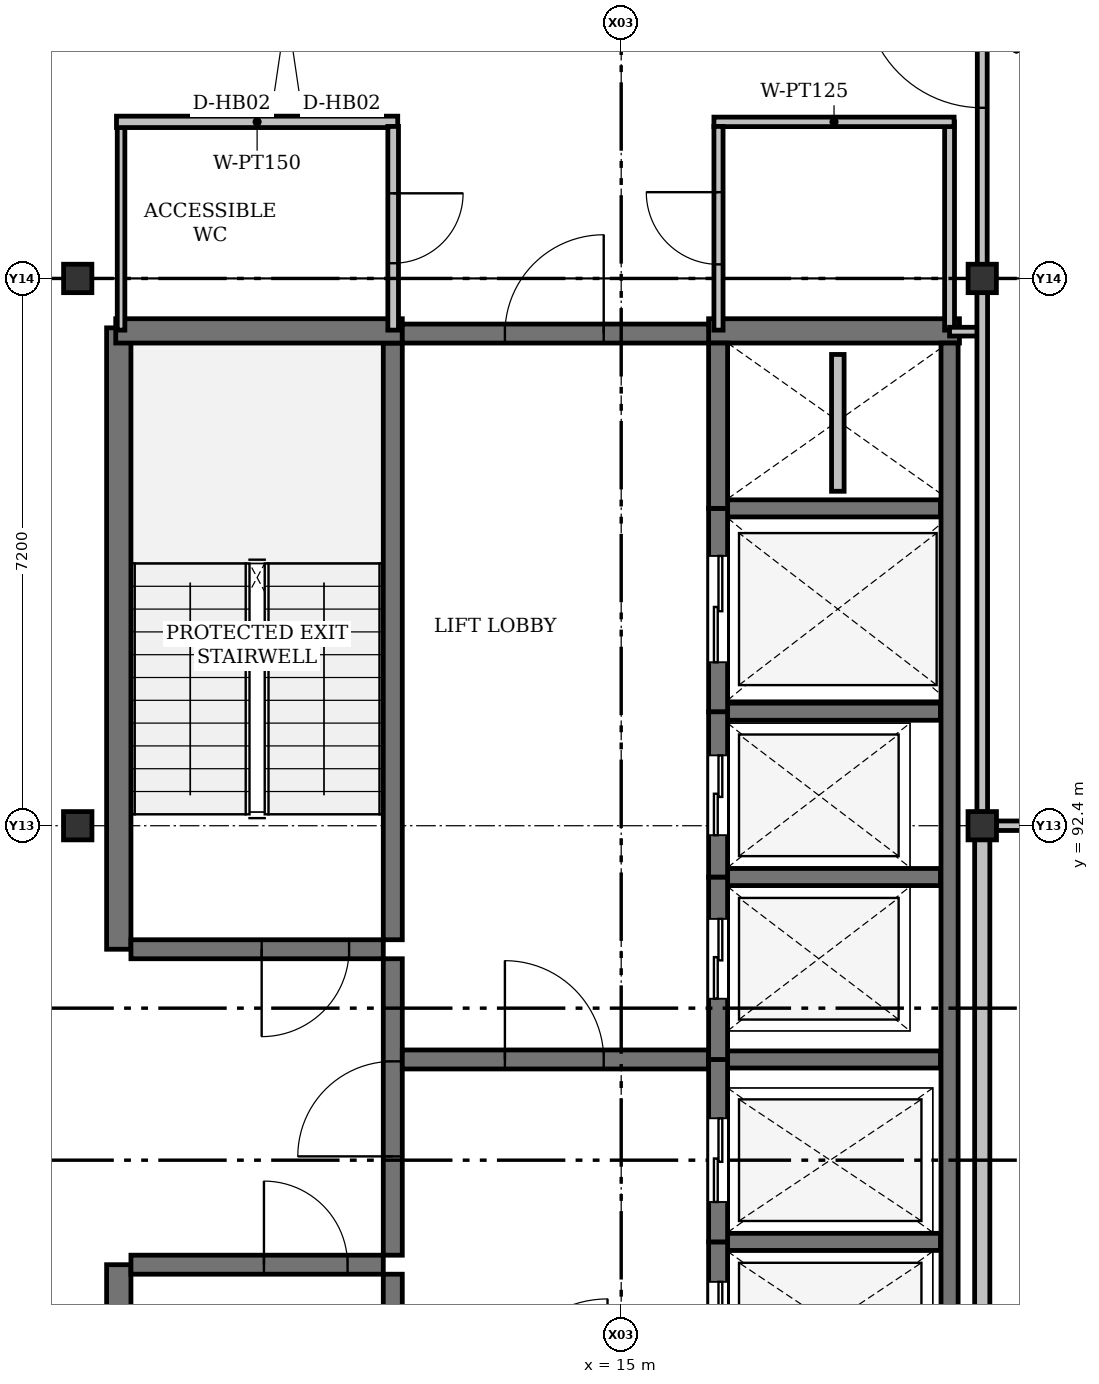
"""IFC4 building model, lengths in metres.
Left out: names, types, materials, properties, quantities, classifications, styles, units other than length and angle.
Written with IfcOpenShell. Run it as: python <this file> out.ifc"""

import sys

from ifc_helpers import new_model, si_unit, direction, frame, frame_2d, origin, origin_2d, place, context, subcontext, project, spatial, rectangle, i_section, extrude, element, fill, save


model = new_model("IFC4")
c1 = context("Model", 3, precision=1e-05, world=origin(), true_north=direction((0.0, 1.0)))
c2 = subcontext(c1, "Body", "Model", "MODEL_VIEW")
j1 = project(units=[si_unit("LENGTHUNIT", "METRE"), si_unit("PLANEANGLEUNIT", "RADIAN")], contexts=[c1])
p1 = place(None, origin())
s1 = spatial("IfcSite", under=j1, at=p1, CompositionType="ELEMENT")
p2 = place(p1, origin())
s2 = spatial("IfcBuilding", under=s1, at=p2, CompositionType="ELEMENT")
p3 = place(p2, frame((0.0, 0.0, 26.7)))
s3 = spatial("IfcBuildingStorey", under=s2, at=p3, CompositionType="ELEMENT", Elevation=26.7)
for number, where, z_axis, x_axis in (
    (1, (7.85, 92.4, 0.0), (0.0, 0.0, 1.0), (1.0, 0.0, 0.0)),
    (2, (19.75, 92.4, 0.0), (0.0, 0.0, 1.0), (1.0, 0.0, 0.0)),
    (3, (7.85, 99.6, 0.0), (0.0, 0.0, 1.0), (0.0, 1.0, 0.0)),
    (4, (19.75, 99.6, 0.0), (0.0, 0.0, 1.0), (0.0, 1.0, 0.0)),
):
    element("IfcColumn", number, at=place(p3, frame(where, z_axis=z_axis, x_axis=x_axis)), inside=s3, PredefinedType="COLUMN", context=c2, shape_type="SweptSolid", body=[
        extrude(i_section(OverallWidth=0.374, OverallDepth=0.372, WebThickness=0.016, FlangeThickness=0.026, FilletRadius=0.015, at=origin_2d()), origin(), (0.0, 0.0, 1.0), 4.2),
    ])
for number, where, z_axis, x_axis in (
    (5, (8.39, 78.45, 0.0), (0.0, 0.0, 1.0), (0.0, 1.0, 0.0)),
    (6, (8.39, 90.775, 0.0), (0.0, 0.0, 1.0), (0.0, 1.0, 0.0)),
):
    element("IfcWall", number, at=place(p3, frame(where, z_axis=z_axis, x_axis=x_axis)), inside=s3, PredefinedType="SHEAR", context=c2, shape_type="SweptSolid", body=[
        extrude(rectangle(XDim=8.175, YDim=0.32, at=frame_2d((4.087, 0.0))), origin(), (0.0, 0.0, 1.0), 4.2),
    ])
for number, where, z_axis, x_axis in (
    (7, (11.995, 78.65, 0.0), (0.0, 0.0, 1.0), (0.0, 1.0, 0.0)),
    (8, (11.995, 90.9, 0.0), (0.0, 0.0, 1.0), (0.0, 1.0, 0.0)),
):
    element("IfcWall", number, at=place(p3, frame(where, z_axis=z_axis, x_axis=x_axis)), inside=s3, PredefinedType="SHEAR", context=c2, shape_type="SweptSolid", body=[
        extrude(rectangle(XDim=7.85, YDim=0.25, at=frame_2d((3.925, 0.0))), origin(), (0.0, 0.0, 1.0), 4.2),
    ])
p4 = place(p3, frame((11.995, 86.75, 0.0), z_axis=(0.0, 0.0, 1.0), x_axis=(0.0, 1.0, 0.0)))
e9 = element("IfcWall", 9, at=p4, inside=s3, PredefinedType="SHEAR", context=c2, shape_type="SweptSolid", body=[
    extrude(rectangle(XDim=3.9, YDim=0.25, at=frame_2d((1.95, 0.0))), origin(), (0.0, 0.0, 1.0), 4.2),
])
p5 = place(p4, frame((1.3, 0.0, 0.0)))
e10 = element("IfcOpeningElement", 10, at=p5, cuts=e9, PredefinedType="OPENING", context=c2, shape_type="SweptSolid", body=[
    extrude(rectangle(XDim=1.25, YDim=2.2, at=frame_2d((0.625, 1.1))), frame((0.0, 0.125, 0.0), z_axis=(0.0, -1.0, 0.0), x_axis=(1.0, 0.0, 0.0)), (0.0, 0.0, 1.0), 0.25),
])
p6 = place(p3, frame((8.35, 98.91, 0.0), z_axis=(0.0, 0.0, 1.0), x_axis=(1.0, 0.0, 0.0)))
e11 = element("IfcWall", 11, at=p6, inside=s3, PredefinedType="SHEAR", context=c2, shape_type="SweptSolid", body=[
    extrude(rectangle(XDim=3.77, YDim=0.32, at=frame_2d((1.885, 0.0))), origin(), (0.0, 0.0, 1.0), 4.2),
])
p7 = place(p3, frame((16.15, 98.91, 0.0), z_axis=(0.0, 0.0, 1.0), x_axis=(1.0, 0.0, 0.0)))
e12 = element("IfcWall", 12, at=p7, inside=s3, PredefinedType="SHEAR", context=c2, shape_type="SweptSolid", body=[
    extrude(rectangle(XDim=3.3, YDim=0.32, at=frame_2d((1.65, 0.0))), origin(), (0.0, 0.0, 1.0), 4.2),
])
p8 = place(p3, frame((12.12, 98.875, 0.0), z_axis=(0.0, 0.0, 1.0), x_axis=(1.0, 0.0, 0.0)))
e13 = element("IfcWall", 13, at=p8, inside=s3, PredefinedType="SHEAR", context=c2, shape_type="SweptSolid", body=[
    extrude(rectangle(XDim=4.03, YDim=0.25, at=frame_2d((2.015, 0.0))), origin(), (0.0, 0.0, 1.0), 4.2),
])
p9 = place(p8, frame((1.35, 0.0, 0.0)))
e14 = element("IfcOpeningElement", 14, at=p9, cuts=e13, PredefinedType="OPENING", context=c2, shape_type="SweptSolid", body=[
    extrude(rectangle(XDim=1.3, YDim=2.2, at=frame_2d((0.65, 1.1))), frame((0.0, 0.125, 0.0), z_axis=(0.0, -1.0, 0.0), x_axis=(1.0, 0.0, 0.0)), (0.0, 0.0, 1.0), 0.25),
])
p10 = place(p3, frame((8.55, 86.625, 0.0), z_axis=(0.0, 0.0, 1.0), x_axis=(1.0, 0.0, 0.0)))
e15 = element("IfcWall", 15, at=p10, inside=s3, PredefinedType="SHEAR", context=c2, shape_type="SweptSolid", body=[
    extrude(rectangle(XDim=3.32, YDim=0.25, at=frame_2d((1.66, 0.0))), origin(), (0.0, 0.0, 1.0), 4.2),
])
p11 = place(p10, frame((1.75, 0.0, 0.0)))
e16 = element("IfcOpeningElement", 16, at=p11, cuts=e15, PredefinedType="OPENING", context=c2, shape_type="SweptSolid", body=[
    extrude(rectangle(XDim=1.1, YDim=2.15, at=frame_2d((0.55, 1.075))), frame((0.0, 0.125, 0.0), z_axis=(0.0, -1.0, 0.0), x_axis=(1.0, 0.0, 0.0)), (0.0, 0.0, 1.0), 0.25),
])
p12 = place(p3, frame((11.87, 90.775, 0.0), z_axis=(0.0, 0.0, 1.0), x_axis=(-1.0, 0.0, 0.0)))
e17 = element("IfcWall", 17, at=p12, inside=s3, PredefinedType="SHEAR", context=c2, shape_type="SweptSolid", body=[
    extrude(rectangle(XDim=3.32, YDim=0.25, at=frame_2d((1.66, 0.0))), origin(), (0.0, 0.0, 1.0), 4.2),
])
p13 = place(p12, frame((0.45, 0.0, 0.0)))
e18 = element("IfcOpeningElement", 18, at=p13, cuts=e17, PredefinedType="OPENING", context=c2, shape_type="SweptSolid", body=[
    extrude(rectangle(XDim=1.15, YDim=2.15, at=frame_2d((0.575, 1.075))), frame((0.0, 0.125, 0.0), z_axis=(0.0, -1.0, 0.0), x_axis=(1.0, 0.0, 0.0)), (0.0, 0.0, 1.0), 0.25),
])
p14 = place(p3, frame((12.12, 89.325, 0.0), z_axis=(0.0, 0.0, 1.0), x_axis=(1.0, 0.0, 0.0)))
e19 = element("IfcWall", 19, at=p14, inside=s3, PredefinedType="SHEAR", context=c2, shape_type="SweptSolid", body=[
    extrude(rectangle(XDim=4.03, YDim=0.25, at=frame_2d((2.015, 0.0))), origin(), (0.0, 0.0, 1.0), 4.2),
])
p15 = place(p14, frame((1.35, 0.0, 0.0)))
e20 = element("IfcOpeningElement", 20, at=p15, cuts=e19, PredefinedType="OPENING", context=c2, shape_type="SweptSolid", body=[
    extrude(rectangle(XDim=1.3, YDim=2.2, at=frame_2d((0.65, 1.1))), frame((0.0, 0.125, 0.0), z_axis=(0.0, -1.0, 0.0), x_axis=(1.0, 0.0, 0.0)), (0.0, 0.0, 1.0), 0.25),
])
p16 = place(p3, frame((19.32, 84.8, 0.0), z_axis=(0.0, 0.0, 1.0), x_axis=(0.0, 1.0, 0.0)))
e21 = element("IfcWall", 21, at=p16, inside=s3, PredefinedType="SHEAR", context=c2, shape_type="SweptSolid", body=[
    extrude(rectangle(XDim=13.95, YDim=0.225, at=frame_2d((6.975, 0.0))), origin(), (0.0, 0.0, 1.0), 4.2),
])
for number, where, z_axis, x_axis in (
    (22, (16.4, 86.925, 0.0), (0.0, 0.0, 1.0), (1.0, 0.0, 0.0)),
    (23, (16.4, 89.325, 0.0), (0.0, 0.0, 1.0), (1.0, 0.0, 0.0)),
    (24, (16.4, 91.725, 0.0), (0.0, 0.0, 1.0), (1.0, 0.0, 0.0)),
    (25, (16.4, 93.9, 0.0), (0.0, 0.0, 1.0), (1.0, 0.0, 0.0)),
    (26, (16.4, 96.575, 0.0), (0.0, 0.0, 1.0), (1.0, 0.0, 0.0)),
):
    element("IfcWall", number, at=place(p3, frame(where, z_axis=z_axis, x_axis=x_axis)), inside=s3, PredefinedType="SHEAR", context=c2, shape_type="SweptSolid", body=[
        extrude(rectangle(XDim=2.8, YDim=0.225, at=frame_2d((1.4, 0.0))), origin(), (0.0, 0.0, 1.0), 4.2),
    ])
p17 = place(p3, frame((16.275, 84.8, 0.0), z_axis=(0.0, 0.0, 1.0), x_axis=(0.0, 1.0, 0.0)))
e27 = element("IfcWall", 27, at=p17, inside=s3, PredefinedType="SHEAR", context=c2, shape_type="SweptSolid", body=[
    extrude(rectangle(XDim=2.125, YDim=0.25, at=frame_2d((1.062, 0.0))), origin(), (0.0, 0.0, 1.0), 4.2),
])
p18 = place(p17, frame((0.5, 0.0, 0.0)))
e28 = element("IfcOpeningElement", 28, at=p18, cuts=e27, PredefinedType="OPENING", context=c2, shape_type="SweptSolid", body=[
    extrude(rectangle(XDim=1.1, YDim=2.15, at=frame_2d((0.55, 1.075))), frame((0.0, 0.125, 0.0), z_axis=(0.0, -1.0, 0.0), x_axis=(1.0, 0.0, 0.0)), (0.0, 0.0, 1.0), 0.25),
])
p19 = place(p3, frame((16.275, 86.925, 0.0), z_axis=(0.0, 0.0, 1.0), x_axis=(0.0, 1.0, 0.0)))
e29 = element("IfcWall", 29, at=p19, inside=s3, PredefinedType="SHEAR", context=c2, shape_type="SweptSolid", body=[
    extrude(rectangle(XDim=2.4, YDim=0.25, at=frame_2d((1.2, 0.0))), origin(), (0.0, 0.0, 1.0), 4.2),
])
p20 = place(p19, frame((0.525, 0.0, 0.0)))
e30 = element("IfcOpeningElement", 30, at=p20, cuts=e29, PredefinedType="OPENING", context=c2, shape_type="SweptSolid", body=[
    extrude(rectangle(XDim=1.1, YDim=2.15, at=frame_2d((0.55, 1.075))), frame((0.0, 0.125, 0.0), z_axis=(0.0, -1.0, 0.0), x_axis=(1.0, 0.0, 0.0)), (0.0, 0.0, 1.0), 0.25),
])
p21 = place(p3, frame((16.275, 89.325, 0.0), z_axis=(0.0, 0.0, 1.0), x_axis=(0.0, 1.0, 0.0)))
e31 = element("IfcWall", 31, at=p21, inside=s3, PredefinedType="SHEAR", context=c2, shape_type="SweptSolid", body=[
    extrude(rectangle(XDim=2.4, YDim=0.25, at=frame_2d((1.2, 0.0))), origin(), (0.0, 0.0, 1.0), 4.2),
])
p22 = place(p21, frame((0.8, 0.0, 0.0)))
e32 = element("IfcOpeningElement", 32, at=p22, cuts=e31, PredefinedType="OPENING", context=c2, shape_type="SweptSolid", body=[
    extrude(rectangle(XDim=1.05, YDim=2.15, at=frame_2d((0.525, 1.075))), frame((0.0, 0.125, 0.0), z_axis=(0.0, -1.0, 0.0), x_axis=(1.0, 0.0, 0.0)), (0.0, 0.0, 1.0), 0.25),
])
p23 = place(p3, frame((16.275, 91.725, 0.0), z_axis=(0.0, 0.0, 1.0), x_axis=(0.0, 1.0, 0.0)))
e33 = element("IfcWall", 33, at=p23, inside=s3, PredefinedType="SHEAR", context=c2, shape_type="SweptSolid", body=[
    extrude(rectangle(XDim=2.175, YDim=0.25, at=frame_2d((1.087, 0.0))), origin(), (0.0, 0.0, 1.0), 4.2),
])
p24 = place(p23, frame((0.55, 0.0, 0.0)))
e34 = element("IfcOpeningElement", 34, at=p24, cuts=e33, PredefinedType="OPENING", context=c2, shape_type="SweptSolid", body=[
    extrude(rectangle(XDim=1.05, YDim=2.15, at=frame_2d((0.525, 1.075))), frame((0.0, 0.125, 0.0), z_axis=(0.0, -1.0, 0.0), x_axis=(1.0, 0.0, 0.0)), (0.0, 0.0, 1.0), 0.25),
])
p25 = place(p3, frame((16.275, 93.9, 0.0), z_axis=(0.0, 0.0, 1.0), x_axis=(0.0, 1.0, 0.0)))
e35 = element("IfcWall", 35, at=p25, inside=s3, PredefinedType="SHEAR", context=c2, shape_type="SweptSolid", body=[
    extrude(rectangle(XDim=2.675, YDim=0.25, at=frame_2d((1.337, 0.0))), origin(), (0.0, 0.0, 1.0), 4.2),
])
p26 = place(p25, frame((0.65, 0.0, 0.0)))
e36 = element("IfcOpeningElement", 36, at=p26, cuts=e35, PredefinedType="OPENING", context=c2, shape_type="SweptSolid", body=[
    extrude(rectangle(XDim=1.4, YDim=2.25, at=frame_2d((0.7, 1.125))), frame((0.0, 0.125, 0.0), z_axis=(0.0, -1.0, 0.0), x_axis=(1.0, 0.0, 0.0)), (0.0, 0.0, 1.0), 0.25),
])
p27 = place(p3, frame((16.275, 96.575, 0.0), z_axis=(0.0, 0.0, 1.0), x_axis=(0.0, 1.0, 0.0)))
e37 = element("IfcWall", 37, at=p27, inside=s3, PredefinedType="SHEAR", context=c2, shape_type="SweptSolid", body=[
    extrude(rectangle(XDim=2.175, YDim=0.25, at=frame_2d((1.087, 0.0))), origin(), (0.0, 0.0, 1.0), 4.2),
])
p28 = place(p3, frame((17.85, 96.8, 0.0), z_axis=(0.0, 0.0, 1.0), x_axis=(0.0, 1.0, 0.0)))
e38 = element("IfcWall", 38, at=p28, inside=s3, PredefinedType="PLUMBINGWALL", context=c2, shape_type="SweptSolid", body=[
    extrude(rectangle(XDim=1.8, YDim=0.165, at=frame_2d((0.9, 0.0))), origin(), (0.0, 0.0, 1.0), 4.2),
])
p29 = place(p3, frame((8.42, 98.92, 0.0), z_axis=(0.0, 0.0, 1.0), x_axis=(0.0, 1.0, 0.0)))
e39 = element("IfcWall", 39, at=p29, inside=s3, PredefinedType="PARTITIONING", context=c2, shape_type="SweptSolid", body=[
    extrude(rectangle(XDim=2.74, YDim=0.1, at=frame_2d((1.37, 0.0))), origin(), (0.0, 0.0, 1.0), 3.277),
])
p30 = place(p3, frame((8.36, 101.66, 0.0), z_axis=(0.0, 0.0, 1.0), x_axis=(1.0, 0.0, 0.0)))
e40 = element("IfcWall", 40, at=p30, inside=s3, PredefinedType="PARTITIONING", context=c2, shape_type="SweptSolid", body=[
    extrude(rectangle(XDim=3.7, YDim=0.15, at=frame_2d((1.85, 0.0))), origin(), (0.0, 0.0, 1.0), 3.95),
])
p31 = place(p3, frame((12.0, 101.6, 0.0), z_axis=(0.0, 0.0, 1.0), x_axis=(0.0, -1.0, 0.0)))
e41 = element("IfcWall", 41, at=p31, inside=s3, PredefinedType="PARTITIONING", context=c2, shape_type="SweptSolid", body=[
    extrude(rectangle(XDim=2.68, YDim=0.14, at=frame_2d((1.34, 0.0))), origin(), (0.0, 0.0, 1.0), 3.277),
])
p32 = place(p31, frame((0.88, 0.0, 0.0)))
e42 = element("IfcOpeningElement", 42, at=p32, cuts=e41, PredefinedType="OPENING", context=c2, shape_type="SweptSolid", body=[
    extrude(rectangle(XDim=0.92, YDim=2.1, at=frame_2d((0.46, 1.05))), frame((0.0, 0.07, 0.0), z_axis=(0.0, -1.0, 0.0), x_axis=(1.0, 0.0, 0.0)), (0.0, 0.0, 1.0), 0.14),
])
p33 = place(p3, frame((19.32, 98.92, 0.0), z_axis=(0.0, 0.0, 1.0), x_axis=(0.0, 1.0, 0.0)))
e43 = element("IfcWall", 43, at=p33, inside=s3, PredefinedType="PARTITIONING", context=c2, shape_type="SweptSolid", body=[
    extrude(rectangle(XDim=2.74, YDim=0.13, at=frame_2d((1.37, 0.0))), origin(), (0.0, 0.0, 1.0), 3.277),
])
p34 = place(p3, frame((19.38, 101.66, 0.0), z_axis=(0.0, 0.0, 1.0), x_axis=(-1.0, 0.0, 0.0)))
e44 = element("IfcWall", 44, at=p34, inside=s3, PredefinedType="PARTITIONING", context=c2, shape_type="SweptSolid", body=[
    extrude(rectangle(XDim=3.16, YDim=0.125, at=frame_2d((1.58, 0.0))), origin(), (0.0, 0.0, 1.0), 3.95),
])
p35 = place(p3, frame((16.28, 98.92, 0.0), z_axis=(0.0, 0.0, 1.0), x_axis=(0.0, 1.0, 0.0)))
e45 = element("IfcWall", 45, at=p35, inside=s3, PredefinedType="PARTITIONING", context=c2, shape_type="SweptSolid", body=[
    extrude(rectangle(XDim=2.68, YDim=0.12, at=frame_2d((1.34, 0.0))), origin(), (0.0, 0.0, 1.0), 3.277),
])
p36 = place(p35, frame((0.865, 0.0, 0.0)))
e46 = element("IfcOpeningElement", 46, at=p36, cuts=e45, PredefinedType="OPENING", context=c2, shape_type="SweptSolid", body=[
    extrude(rectangle(XDim=0.95, YDim=2.1, at=frame_2d((0.475, 1.05))), frame((0.0, 0.06, 0.0), z_axis=(0.0, -1.0, 0.0), x_axis=(1.0, 0.0, 0.0)), (0.0, 0.0, 1.0), 0.12),
])
p37 = place(p3, frame((19.75, 98.9, 0.0), z_axis=(0.0, 0.0, 1.0), x_axis=(-1.0, 0.0, 0.0)))
e47 = element("IfcWall", 47, at=p37, inside=s3, PredefinedType="PARTITIONING", context=c2, shape_type="SweptSolid", body=[
    extrude(rectangle(XDim=0.43, YDim=0.115, at=frame_2d((0.215, 0.0))), origin(), (0.0, 0.0, 1.0), 3.507),
])
p38 = place(p3, frame((19.75, 85.382, 0.0), z_axis=(0.0, 0.0, 1.0), x_axis=(0.0, 1.0, 0.0)))
e48 = element("IfcWall", 48, at=p38, inside=s3, PredefinedType="SOLIDWALL", context=c2, shape_type="SweptSolid", body=[
    extrude(rectangle(XDim=6.837, YDim=0.2, at=frame_2d((3.418, 0.0))), origin(), (0.0, 0.0, 1.0), 3.507),
])
p39 = place(p3, frame((19.75, 92.581, 0.0), z_axis=(0.0, 0.0, 1.0), x_axis=(0.0, 1.0, 0.0)))
e49 = element("IfcWall", 49, at=p39, inside=s3, PredefinedType="PARTITIONING", context=c2, shape_type="SweptSolid", body=[
    extrude(rectangle(XDim=6.837, YDim=0.14, at=frame_2d((3.418, 0.0))), origin(), (0.0, 0.0, 1.0), 3.507),
])
p40 = place(p3, frame((19.75, 99.782, 0.0), z_axis=(0.0, 0.0, 1.0), x_axis=(0.0, 1.0, 0.0)))
e50 = element("IfcWall", 50, at=p40, inside=s3, PredefinedType="PARTITIONING", context=c2, shape_type="SweptSolid", body=[
    extrude(rectangle(XDim=3.818, YDim=0.13, at=frame_2d((1.909, 0.0))), origin(), (0.0, 0.0, 1.0), 3.507),
])
p41 = place(p40, frame((2.063, 0.0, 0.0)))
e51 = element("IfcOpeningElement", 51, at=p41, cuts=e50, PredefinedType="OPENING", context=c2, shape_type="SweptSolid", body=[
    extrude(rectangle(XDim=1.55, YDim=2.3, at=frame_2d((0.775, 1.15))), frame((0.0, 0.065, 0.0), z_axis=(0.0, -1.0, 0.0), x_axis=(1.0, 0.0, 0.0)), (0.0, 0.0, 1.0), 0.13),
])
p42 = place(p3, frame((27.868, 92.4, 0.0), z_axis=(0.0, 0.0, 1.0), x_axis=(-1.0, 0.0, 0.0)))
e52 = element("IfcWall", 52, at=p42, inside=s3, PredefinedType="PARTITIONING", context=c2, shape_type="SweptSolid", body=[
    extrude(rectangle(XDim=7.936, YDim=0.125, at=frame_2d((3.968, 0.0))), origin(), (0.0, 0.0, 1.0), 3.277),
])
p43 = place(p5, origin())
e53 = element("IfcDoor", 53, at=p43, inside=s3, OperationType="SINGLE_SWING_LEFT", PredefinedType="DOOR", context=c2, shape_type="SweptSolid", body=[
    extrude(rectangle(XDim=1.25, YDim=2.2, at=frame_2d((0.625, 1.1))), frame((0.0, 0.025, 0.0), z_axis=(0.0, -1.0, 0.0), x_axis=(1.0, 0.0, 0.0)), (0.0, 0.0, 1.0), 0.05),
])
fill(e10, e53)
p44 = place(p9, origin())
e54 = element("IfcDoor", 54, at=p44, inside=s3, OperationType="SINGLE_SWING_RIGHT", PredefinedType="DOOR", context=c2, shape_type="SweptSolid", body=[
    extrude(rectangle(XDim=1.3, YDim=2.2, at=frame_2d((0.65, 1.1))), frame((0.0, 0.025, 0.0), z_axis=(0.0, -1.0, 0.0), x_axis=(1.0, 0.0, 0.0)), (0.0, 0.0, 1.0), 0.05),
])
fill(e14, e54)
p45 = place(p11, origin())
e55 = element("IfcDoor", 55, at=p45, inside=s3, OperationType="SINGLE_SWING_LEFT", PredefinedType="DOOR", context=c2, shape_type="SweptSolid", body=[
    extrude(rectangle(XDim=1.1, YDim=2.15, at=frame_2d((0.55, 1.075))), frame((0.0, 0.025, 0.0), z_axis=(0.0, -1.0, 0.0), x_axis=(1.0, 0.0, 0.0)), (0.0, 0.0, 1.0), 0.05),
])
fill(e16, e55)
p46 = place(p13, origin())
e56 = element("IfcDoor", 56, at=p46, inside=s3, OperationType="SINGLE_SWING_RIGHT", PredefinedType="DOOR", context=c2, shape_type="SweptSolid", body=[
    extrude(rectangle(XDim=1.15, YDim=2.15, at=frame_2d((0.575, 1.075))), frame((0.0, 0.025, 0.0), z_axis=(0.0, -1.0, 0.0), x_axis=(1.0, 0.0, 0.0)), (0.0, 0.0, 1.0), 0.05),
])
fill(e18, e56)
p47 = place(p15, origin())
e57 = element("IfcDoor", 57, at=p47, inside=s3, OperationType="SINGLE_SWING_LEFT", PredefinedType="DOOR", context=c2, shape_type="SweptSolid", body=[
    extrude(rectangle(XDim=1.3, YDim=2.2, at=frame_2d((0.65, 1.1))), frame((0.0, 0.025, 0.0), z_axis=(0.0, -1.0, 0.0), x_axis=(1.0, 0.0, 0.0)), (0.0, 0.0, 1.0), 0.05),
])
fill(e20, e57)
p48 = place(p18, origin())
e58 = element("IfcDoor", 58, at=p48, inside=s3, OperationType="SLIDING_TO_LEFT", PredefinedType="DOOR", context=c2, shape_type="SweptSolid", body=[
    extrude(rectangle(XDim=1.1, YDim=2.15, at=frame_2d((0.55, 1.075))), frame((0.0, 0.025, 0.0), z_axis=(0.0, -1.0, 0.0), x_axis=(1.0, 0.0, 0.0)), (0.0, 0.0, 1.0), 0.05),
])
fill(e28, e58)
p49 = place(p20, origin())
e59 = element("IfcDoor", 59, at=p49, inside=s3, OperationType="SLIDING_TO_LEFT", PredefinedType="DOOR", context=c2, shape_type="SweptSolid", body=[
    extrude(rectangle(XDim=1.1, YDim=2.15, at=frame_2d((0.55, 1.075))), frame((0.0, 0.025, 0.0), z_axis=(0.0, -1.0, 0.0), x_axis=(1.0, 0.0, 0.0)), (0.0, 0.0, 1.0), 0.05),
])
fill(e30, e59)
p50 = place(p22, origin())
e60 = element("IfcDoor", 60, at=p50, inside=s3, OperationType="SLIDING_TO_LEFT", PredefinedType="DOOR", context=c2, shape_type="SweptSolid", body=[
    extrude(rectangle(XDim=1.05, YDim=2.15, at=frame_2d((0.525, 1.075))), frame((0.0, 0.025, 0.0), z_axis=(0.0, -1.0, 0.0), x_axis=(1.0, 0.0, 0.0)), (0.0, 0.0, 1.0), 0.05),
])
fill(e32, e60)
p51 = place(p24, origin())
e61 = element("IfcDoor", 61, at=p51, inside=s3, OperationType="SLIDING_TO_LEFT", PredefinedType="DOOR", context=c2, shape_type="SweptSolid", body=[
    extrude(rectangle(XDim=1.05, YDim=2.15, at=frame_2d((0.525, 1.075))), frame((0.0, 0.025, 0.0), z_axis=(0.0, -1.0, 0.0), x_axis=(1.0, 0.0, 0.0)), (0.0, 0.0, 1.0), 0.05),
])
fill(e34, e61)
p52 = place(p26, origin())
e62 = element("IfcDoor", 62, at=p52, inside=s3, OperationType="SLIDING_TO_LEFT", PredefinedType="DOOR", context=c2, shape_type="SweptSolid", body=[
    extrude(rectangle(XDim=1.4, YDim=2.25, at=frame_2d((0.7, 1.125))), frame((0.0, 0.025, 0.0), z_axis=(0.0, -1.0, 0.0), x_axis=(1.0, 0.0, 0.0)), (0.0, 0.0, 1.0), 0.05),
])
fill(e36, e62)
p53 = place(p32, origin())
e63 = element("IfcDoor", 63, at=p53, inside=s3, OperationType="SINGLE_SWING_LEFT", PredefinedType="DOOR", context=c2, shape_type="SweptSolid", body=[
    extrude(rectangle(XDim=0.92, YDim=2.1, at=frame_2d((0.46, 1.05))), frame((0.0, 0.025, 0.0), z_axis=(0.0, -1.0, 0.0), x_axis=(1.0, 0.0, 0.0)), (0.0, 0.0, 1.0), 0.05),
])
fill(e42, e63)
p54 = place(p36, origin())
e64 = element("IfcDoor", 64, at=p54, inside=s3, OperationType="SINGLE_SWING_RIGHT", PredefinedType="DOOR", context=c2, shape_type="SweptSolid", body=[
    extrude(rectangle(XDim=0.95, YDim=2.1, at=frame_2d((0.475, 1.05))), frame((0.0, 0.025, 0.0), z_axis=(0.0, -1.0, 0.0), x_axis=(1.0, 0.0, 0.0)), (0.0, 0.0, 1.0), 0.05),
])
fill(e46, e64)
p55 = place(p41, origin())
e65 = element("IfcDoor", 65, at=p55, inside=s3, OperationType="SINGLE_SWING_RIGHT", PredefinedType="DOOR", context=c2, shape_type="SweptSolid", body=[
    extrude(rectangle(XDim=1.55, YDim=2.3, at=frame_2d((0.775, 1.15))), frame((0.0, 0.025, 0.0), z_axis=(0.0, -1.0, 0.0), x_axis=(1.0, 0.0, 0.0)), (0.0, 0.0, 1.0), 0.05),
])
fill(e51, e65)
save(model, sys.argv[1])
